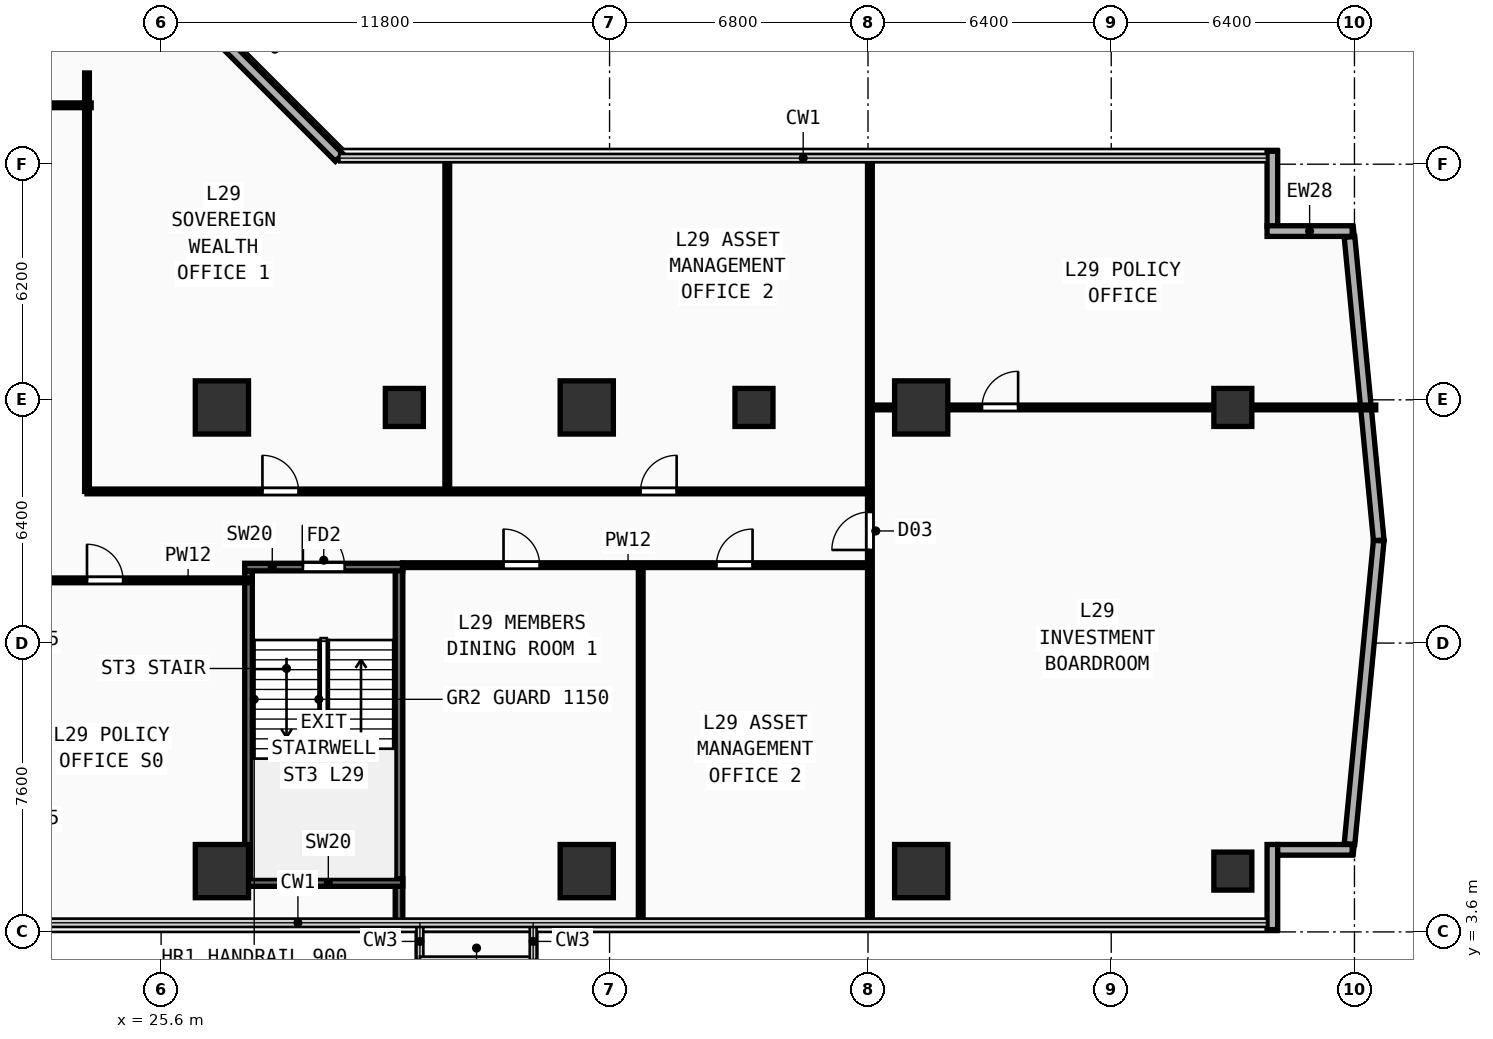
"""IFC4 building model, lengths in metres.
Left out: names, types, materials, properties, quantities, classifications, styles, units other than length and angle.
Written with IfcOpenShell. Run it as: python <this file> out.ifc"""

import sys

from ifc_helpers import new_model, si_unit, direction, frame, frame_2d, origin, origin_2d, place, context, subcontext, project, spatial, rectangle, extrude, element, fill, save


model = new_model("IFC4")
c1 = context("Model", 3, precision=1e-05, world=origin(), true_north=direction((0.0, 1.0)))
c2 = subcontext(c1, "Body", "Model", "MODEL_VIEW")
j1 = project(units=[si_unit("LENGTHUNIT", "METRE"), si_unit("PLANEANGLEUNIT", "RADIAN")], contexts=[c1])
p1 = place(None, origin())
s1 = spatial("IfcSite", under=j1, at=p1, CompositionType="ELEMENT")
p2 = place(p1, origin())
s2 = spatial("IfcBuilding", under=s1, at=p2, CompositionType="ELEMENT")
p3 = place(p2, frame((0.0, 0.0, 114.5)))
s3 = spatial("IfcBuildingStorey", under=s2, at=p3, CompositionType="ELEMENT", Elevation=114.5)
for number, where, z_axis, x_axis in (
    (1, (27.2, 5.2, 0.0), (0.0, 0.0, 1.0), (1.0, 0.0, 0.0)),
    (2, (36.8, 5.2, 0.0), (0.0, 0.0, 1.0), (1.0, 0.0, 0.0)),
    (3, (45.6, 5.2, 0.0), (0.0, 0.0, 1.0), (1.0, 0.0, 0.0)),
    (4, (27.2, 17.4, 0.0), (0.0, 0.0, 1.0), (1.0, 0.0, 0.0)),
    (5, (36.8, 17.4, 0.0), (0.0, 0.0, 1.0), (1.0, 0.0, 0.0)),
    (6, (45.6, 17.4, 0.0), (0.0, 0.0, 1.0), (1.0, 0.0, 0.0)),
):
    element("IfcColumn", number, at=place(p3, frame(where, z_axis=z_axis, x_axis=x_axis)), inside=s3, PredefinedType="COLUMN", context=c2, shape_type="SweptSolid", body=[
        extrude(rectangle(XDim=1.4, YDim=1.4, at=origin_2d()), origin(), (0.0, 0.0, 1.0), 3.54),
    ])
for number, where, z_axis, x_axis in (
    (7, (53.8, 5.2, 0.0), (0.0, 0.0, 1.0), (1.0, 0.0, 0.0)),
    (8, (53.8, 17.4, 0.0), (0.0, 0.0, 1.0), (1.0, 0.0, 0.0)),
    (9, (32.0, 17.4, 0.0), (0.0, 0.0, 1.0), (1.0, 0.0, 0.0)),
    (10, (41.2, 17.4, 0.0), (0.0, 0.0, 1.0), (1.0, 0.0, 0.0)),
):
    element("IfcColumn", number, at=place(p3, frame(where, z_axis=z_axis, x_axis=x_axis)), inside=s3, PredefinedType="COLUMN", context=c2, shape_type="SweptSolid", body=[
        extrude(rectangle(XDim=1.0, YDim=1.0, at=origin_2d()), origin(), (0.0, 0.0, 1.0), 3.54),
    ])
p4 = place(p3, frame((54.84, 3.66, 0.0), z_axis=(0.0, 0.0, 1.0), x_axis=(0.0, 1.0, 0.0)))
e11 = element("IfcWall", 11, at=p4, inside=s3, PredefinedType="SOLIDWALL", context=c2, shape_type="SweptSolid", body=[
    extrude(rectangle(XDim=2.24, YDim=0.28, at=frame_2d((1.12, 0.0))), origin(), (0.0, 0.0, 1.0), 3.54),
])
p5 = place(p3, frame((54.98, 5.76, 0.0), z_axis=(0.0, 0.0, 1.0), x_axis=(1.0, 0.0, 0.0)))
e12 = element("IfcWall", 12, at=p5, inside=s3, PredefinedType="SOLIDWALL", context=c2, shape_type="SweptSolid", body=[
    extrude(rectangle(XDim=1.96, YDim=0.28, at=frame_2d((0.98, 0.0))), origin(), (0.0, 0.0, 1.0), 3.54),
])
p6 = place(p3, frame((54.84, 22.165, 0.0), z_axis=(0.0, 0.0, 1.0), x_axis=(0.0, 1.0, 0.0)))
e13 = element("IfcWall", 13, at=p6, inside=s3, PredefinedType="SOLIDWALL", context=c2, shape_type="SweptSolid", body=[
    extrude(rectangle(XDim=1.975, YDim=0.28, at=frame_2d((0.987, 0.0))), origin(), (0.0, 0.0, 1.0), 3.54),
])
p7 = place(p3, frame((54.7, 22.04, 0.0), z_axis=(0.0, 0.0, 1.0), x_axis=(1.0, 0.0, 0.0)))
e14 = element("IfcWall", 14, at=p7, inside=s3, PredefinedType="SOLIDWALL", context=c2, shape_type="SweptSolid", body=[
    extrude(rectangle(XDim=2.24, YDim=0.28, at=frame_2d((1.12, 0.0))), origin(), (0.0, 0.0, 1.0), 3.54),
])
p8 = place(p3, frame((30.285, 23.975, 0.0), z_axis=(0.0, 0.0, 1.0), x_axis=(-0.707106781187, 0.707106781187, 0.0)))
e15 = element("IfcWall", 15, at=p8, inside=s3, PredefinedType="SOLIDWALL", context=c2, shape_type="SweptSolid", body=[
    extrude(rectangle(XDim=9.207, YDim=0.28, at=frame_2d((4.603, 0.0))), origin(), (0.0, 0.0, 1.0), 3.54),
])
for number, where, z_axis, x_axis in (
    (16, (56.869, 5.914, 0.0), (0.0, 0.0, 1.0), (0.096, 0.995, 0.0)),
    (17, (57.639, 13.905, 0.0), (0.0, 0.0, 1.0), (-0.096, 0.995, 0.0)),
):
    element("IfcWall", number, at=place(p3, frame(where, z_axis=z_axis, x_axis=x_axis)), inside=s3, PredefinedType="SOLIDWALL", context=c2, shape_type="SweptSolid", body=[
        extrude(rectangle(XDim=8.019, YDim=0.28, at=frame_2d((4.009, 0.0))), origin(), (0.0, 0.0, 1.0), 3.54),
    ])
p9 = place(p3, frame((27.9, 5.0, 0.0), z_axis=(0.0, 0.0, 1.0), x_axis=(0.0, 1.0, 0.0)))
e18 = element("IfcWall", 18, at=p9, inside=s3, PredefinedType="SHEAR", context=c2, shape_type="SweptSolid", body=[
    extrude(rectangle(XDim=8.1, YDim=0.2, at=frame_2d((4.05, 0.0))), origin(), (0.0, 0.0, 1.0), 3.54),
])
p10 = place(p3, frame((31.86, 3.84, 0.0), z_axis=(0.0, 0.0, 1.0), x_axis=(0.0, 1.0, 0.0)))
e19 = element("IfcWall", 19, at=p10, inside=s3, PredefinedType="SHEAR", context=c2, shape_type="SweptSolid", body=[
    extrude(rectangle(XDim=9.41, YDim=0.2, at=frame_2d((4.705, 0.0))), origin(), (0.0, 0.0, 1.0), 3.54),
])
p11 = place(p3, frame((27.8, 4.9, 0.0), z_axis=(0.0, 0.0, 1.0), x_axis=(1.0, 0.0, 0.0)))
e20 = element("IfcWall", 20, at=p11, inside=s3, PredefinedType="SHEAR", context=c2, shape_type="SweptSolid", body=[
    extrude(rectangle(XDim=4.16, YDim=0.2, at=frame_2d((2.08, 0.0))), origin(), (0.0, 0.0, 1.0), 3.54),
])
p12 = place(p3, frame((27.8, 13.2, 0.0), z_axis=(0.0, 0.0, 1.0), x_axis=(1.0, 0.0, 0.0)))
e21 = element("IfcWall", 21, at=p12, inside=s3, PredefinedType="SHEAR", context=c2, shape_type="SweptSolid", body=[
    extrude(rectangle(XDim=4.16, YDim=0.2, at=frame_2d((2.08, 0.0))), origin(), (0.0, 0.0, 1.0), 3.54),
])
p13 = place(p12, frame((1.53, 0.0, 0.0)))
e22 = element("IfcOpeningElement", 22, at=p13, cuts=e21, PredefinedType="OPENING", context=c2, shape_type="SweptSolid", body=[
    extrude(rectangle(XDim=1.1, YDim=2.2, at=frame_2d((0.55, 1.1))), frame((0.0, 0.11, 0.0), z_axis=(0.0, -1.0, 0.0), x_axis=(1.0, 0.0, 0.0)), (0.0, 0.0, 1.0), 0.22),
])
p14 = place(p3, frame((20.85, 12.85, 0.0), z_axis=(0.0, 0.0, 1.0), x_axis=(1.0, 0.0, 0.0)))
e23 = element("IfcWall", 23, at=p14, inside=s3, PredefinedType="PARTITIONING", context=c2, shape_type="SweptSolid", body=[
    extrude(rectangle(XDim=7.05, YDim=0.125, at=frame_2d((3.525, 0.0))), origin(), (0.0, 0.0, 1.0), 3.54),
])
p15 = place(p14, frame((2.8, 0.0, 0.0)))
e24 = element("IfcOpeningElement", 24, at=p15, cuts=e23, PredefinedType="OPENING", context=c2, shape_type="SweptSolid", body=[
    extrude(rectangle(XDim=0.95, YDim=2.15, at=frame_2d((0.475, 1.075))), frame((0.0, 0.073, 0.0), z_axis=(0.0, -1.0, 0.0), x_axis=(1.0, 0.0, 0.0)), (0.0, 0.0, 1.0), 0.145),
])
p16 = place(p3, frame((22.65, 25.35, 0.0), z_axis=(0.0, 0.0, 1.0), x_axis=(1.0, 0.0, 0.0)))
e25 = element("IfcWall", 25, at=p16, inside=s3, PredefinedType="PARTITIONING", context=c2, shape_type="SweptSolid", body=[
    extrude(rectangle(XDim=1.11, YDim=0.125, at=frame_2d((0.555, 0.0))), origin(), (0.0, 0.0, 1.0), 3.54),
])
p17 = place(p3, frame((31.95, 13.25, 0.0), z_axis=(0.0, 0.0, 1.0), x_axis=(1.0, 0.0, 0.0)))
e26 = element("IfcWall", 26, at=p17, inside=s3, PredefinedType="PARTITIONING", context=c2, shape_type="SweptSolid", body=[
    extrude(rectangle(XDim=12.3, YDim=0.125, at=frame_2d((6.15, 0.0))), origin(), (0.0, 0.0, 1.0), 3.09),
])
p18 = place(p17, frame((2.66, 0.0, 0.0)))
e27 = element("IfcOpeningElement", 27, at=p18, cuts=e26, PredefinedType="OPENING", context=c2, shape_type="SweptSolid", body=[
    extrude(rectangle(XDim=0.95, YDim=2.15, at=frame_2d((0.475, 1.075))), frame((0.0, 0.073, 0.0), z_axis=(0.0, -1.0, 0.0), x_axis=(1.0, 0.0, 0.0)), (0.0, 0.0, 1.0), 0.145),
])
p19 = place(p17, frame((8.263, 0.0, 0.0)))
e28 = element("IfcOpeningElement", 28, at=p19, cuts=e26, PredefinedType="OPENING", context=c2, shape_type="SweptSolid", body=[
    extrude(rectangle(XDim=0.95, YDim=2.15, at=frame_2d((0.475, 1.075))), frame((0.0, 0.073, 0.0), z_axis=(0.0, -1.0, 0.0), x_axis=(1.0, 0.0, 0.0)), (0.0, 0.0, 1.0), 0.145),
])
p20 = place(p3, frame((38.22, 3.84, 0.0), z_axis=(0.0, 0.0, 1.0), x_axis=(0.0, 1.0, 0.0)))
e29 = element("IfcWall", 29, at=p20, inside=s3, PredefinedType="PARTITIONING", context=c2, shape_type="SweptSolid", body=[
    extrude(rectangle(XDim=9.41, YDim=0.125, at=frame_2d((4.705, 0.0))), origin(), (0.0, 0.0, 1.0), 3.54),
])
p21 = place(p3, frame((44.25, 3.84, 0.0), z_axis=(0.0, 0.0, 1.0), x_axis=(0.0, 1.0, 0.0)))
e30 = element("IfcWall", 30, at=p21, inside=s3, PredefinedType="PARTITIONING", context=c2, shape_type="SweptSolid", body=[
    extrude(rectangle(XDim=20.12, YDim=0.125, at=frame_2d((10.06, 0.0))), origin(), (0.0, 0.0, 1.0), 3.54),
])
p22 = place(p21, frame((9.81, 0.0, 0.0)))
e31 = element("IfcOpeningElement", 31, at=p22, cuts=e30, PredefinedType="OPENING", context=c2, shape_type="SweptSolid", body=[
    extrude(rectangle(XDim=1.0, YDim=2.2, at=frame_2d((0.5, 1.1))), frame((0.0, 0.073, 0.0), z_axis=(0.0, -1.0, 0.0), x_axis=(1.0, 0.0, 0.0)), (0.0, 0.0, 1.0), 0.145),
])
p23 = place(p3, frame((44.25, 17.4, 0.0), z_axis=(0.0, 0.0, 1.0), x_axis=(1.0, 0.0, 0.0)))
e32 = element("IfcWall", 32, at=p23, inside=s3, PredefinedType="PARTITIONING", context=c2, shape_type="SweptSolid", body=[
    extrude(rectangle(XDim=13.31, YDim=0.125, at=frame_2d((6.655, 0.0))), origin(), (0.0, 0.0, 1.0), 3.24),
])
p24 = place(p23, frame((2.95, 0.0, 0.0)))
e33 = element("IfcOpeningElement", 33, at=p24, cuts=e32, PredefinedType="OPENING", context=c2, shape_type="SweptSolid", body=[
    extrude(rectangle(XDim=0.95, YDim=2.15, at=frame_2d((0.475, 1.075))), frame((0.0, 0.073, 0.0), z_axis=(0.0, -1.0, 0.0), x_axis=(1.0, 0.0, 0.0)), (0.0, 0.0, 1.0), 0.145),
])
p25 = place(p3, frame((23.65, 15.19, 0.0), z_axis=(0.0, 0.0, 1.0), x_axis=(0.0, 1.0, 0.0)))
e34 = element("IfcWall", 34, at=p25, inside=s3, PredefinedType="PARTITIONING", context=c2, shape_type="SweptSolid", body=[
    extrude(rectangle(XDim=11.01, YDim=0.125, at=frame_2d((5.505, 0.0))), origin(), (0.0, 0.0, 1.0), 3.54),
])
p26 = place(p3, frame((23.65, 15.19, 0.0), z_axis=(0.0, 0.0, 1.0), x_axis=(1.0, 0.0, 0.0)))
e35 = element("IfcWall", 35, at=p26, inside=s3, PredefinedType="PARTITIONING", context=c2, shape_type="SweptSolid", body=[
    extrude(rectangle(XDim=20.6, YDim=0.125, at=frame_2d((10.3, 0.0))), origin(), (0.0, 0.0, 1.0), 3.54),
])
p27 = place(p26, frame((4.616, 0.0, 0.0)))
e36 = element("IfcOpeningElement", 36, at=p27, cuts=e35, PredefinedType="OPENING", context=c2, shape_type="SweptSolid", body=[
    extrude(rectangle(XDim=0.95, YDim=2.15, at=frame_2d((0.475, 1.075))), frame((0.0, 0.073, 0.0), z_axis=(0.0, -1.0, 0.0), x_axis=(1.0, 0.0, 0.0)), (0.0, 0.0, 1.0), 0.145),
])
p28 = place(p26, frame((14.565, 0.0, 0.0)))
e37 = element("IfcOpeningElement", 37, at=p28, cuts=e35, PredefinedType="OPENING", context=c2, shape_type="SweptSolid", body=[
    extrude(rectangle(XDim=0.95, YDim=2.15, at=frame_2d((0.475, 1.075))), frame((0.0, 0.073, 0.0), z_axis=(0.0, -1.0, 0.0), x_axis=(1.0, 0.0, 0.0)), (0.0, 0.0, 1.0), 0.145),
])
p29 = place(p3, frame((33.13, 15.19, 0.0), z_axis=(0.0, 0.0, 1.0), x_axis=(0.0, 1.0, 0.0)))
e38 = element("IfcWall", 38, at=p29, inside=s3, PredefinedType="PARTITIONING", context=c2, shape_type="SweptSolid", body=[
    extrude(rectangle(XDim=8.77, YDim=0.125, at=frame_2d((4.385, 0.0))), origin(), (0.0, 0.0, 1.0), 3.54),
])
p30 = place(p13, frame((1.1, 0.0, 0.0), z_axis=(0.0, 0.0, 1.0), x_axis=(-1.0, 0.0, 0.0)))
e39 = element("IfcDoor", 39, at=p30, inside=s3, OperationType="SINGLE_SWING_RIGHT", PredefinedType="DOOR", context=c2, shape_type="SweptSolid", body=[
    extrude(rectangle(XDim=1.1, YDim=2.2, at=frame_2d((0.55, 1.1))), frame((0.0, 0.025, 0.0), z_axis=(0.0, -1.0, 0.0), x_axis=(1.0, 0.0, 0.0)), (0.0, 0.0, 1.0), 0.05),
])
fill(e22, e39)
p31 = place(p15, origin())
e40 = element("IfcDoor", 40, at=p31, inside=s3, OperationType="SINGLE_SWING_LEFT", PredefinedType="DOOR", context=c2, shape_type="SweptSolid", body=[
    extrude(rectangle(XDim=0.95, YDim=2.15, at=frame_2d((0.475, 1.075))), frame((0.0, 0.025, 0.0), z_axis=(0.0, -1.0, 0.0), x_axis=(1.0, 0.0, 0.0)), (0.0, 0.0, 1.0), 0.05),
])
fill(e24, e40)
p32 = place(p18, origin())
e41 = element("IfcDoor", 41, at=p32, inside=s3, OperationType="SINGLE_SWING_LEFT", PredefinedType="DOOR", context=c2, shape_type="SweptSolid", body=[
    extrude(rectangle(XDim=0.95, YDim=2.15, at=frame_2d((0.475, 1.075))), frame((0.0, 0.025, 0.0), z_axis=(0.0, -1.0, 0.0), x_axis=(1.0, 0.0, 0.0)), (0.0, 0.0, 1.0), 0.05),
])
fill(e27, e41)
p33 = place(p19, origin())
e42 = element("IfcDoor", 42, at=p33, inside=s3, OperationType="SINGLE_SWING_RIGHT", PredefinedType="DOOR", context=c2, shape_type="SweptSolid", body=[
    extrude(rectangle(XDim=0.95, YDim=2.15, at=frame_2d((0.475, 1.075))), frame((0.0, 0.025, 0.0), z_axis=(0.0, -1.0, 0.0), x_axis=(1.0, 0.0, 0.0)), (0.0, 0.0, 1.0), 0.05),
])
fill(e28, e42)
p34 = place(p22, origin())
e43 = element("IfcDoor", 43, at=p34, inside=s3, OperationType="SINGLE_SWING_LEFT", PredefinedType="DOOR", context=c2, shape_type="SweptSolid", body=[
    extrude(rectangle(XDim=1.0, YDim=2.2, at=frame_2d((0.5, 1.1))), frame((0.0, 0.025, 0.0), z_axis=(0.0, -1.0, 0.0), x_axis=(1.0, 0.0, 0.0)), (0.0, 0.0, 1.0), 0.05),
])
fill(e31, e43)
p35 = place(p24, origin())
e44 = element("IfcDoor", 44, at=p35, inside=s3, OperationType="SINGLE_SWING_RIGHT", PredefinedType="DOOR", context=c2, shape_type="SweptSolid", body=[
    extrude(rectangle(XDim=0.95, YDim=2.15, at=frame_2d((0.475, 1.075))), frame((0.0, 0.025, 0.0), z_axis=(0.0, -1.0, 0.0), x_axis=(1.0, 0.0, 0.0)), (0.0, 0.0, 1.0), 0.05),
])
fill(e33, e44)
p36 = place(p27, origin())
e45 = element("IfcDoor", 45, at=p36, inside=s3, OperationType="SINGLE_SWING_LEFT", PredefinedType="DOOR", context=c2, shape_type="SweptSolid", body=[
    extrude(rectangle(XDim=0.95, YDim=2.15, at=frame_2d((0.475, 1.075))), frame((0.0, 0.025, 0.0), z_axis=(0.0, -1.0, 0.0), x_axis=(1.0, 0.0, 0.0)), (0.0, 0.0, 1.0), 0.05),
])
fill(e36, e45)
p37 = place(p28, origin())
e46 = element("IfcDoor", 46, at=p37, inside=s3, OperationType="SINGLE_SWING_RIGHT", PredefinedType="DOOR", context=c2, shape_type="SweptSolid", body=[
    extrude(rectangle(XDim=0.95, YDim=2.15, at=frame_2d((0.475, 1.075))), frame((0.0, 0.025, 0.0), z_axis=(0.0, -1.0, 0.0), x_axis=(1.0, 0.0, 0.0)), (0.0, 0.0, 1.0), 0.05),
])
fill(e37, e46)
save(model, sys.argv[1])
